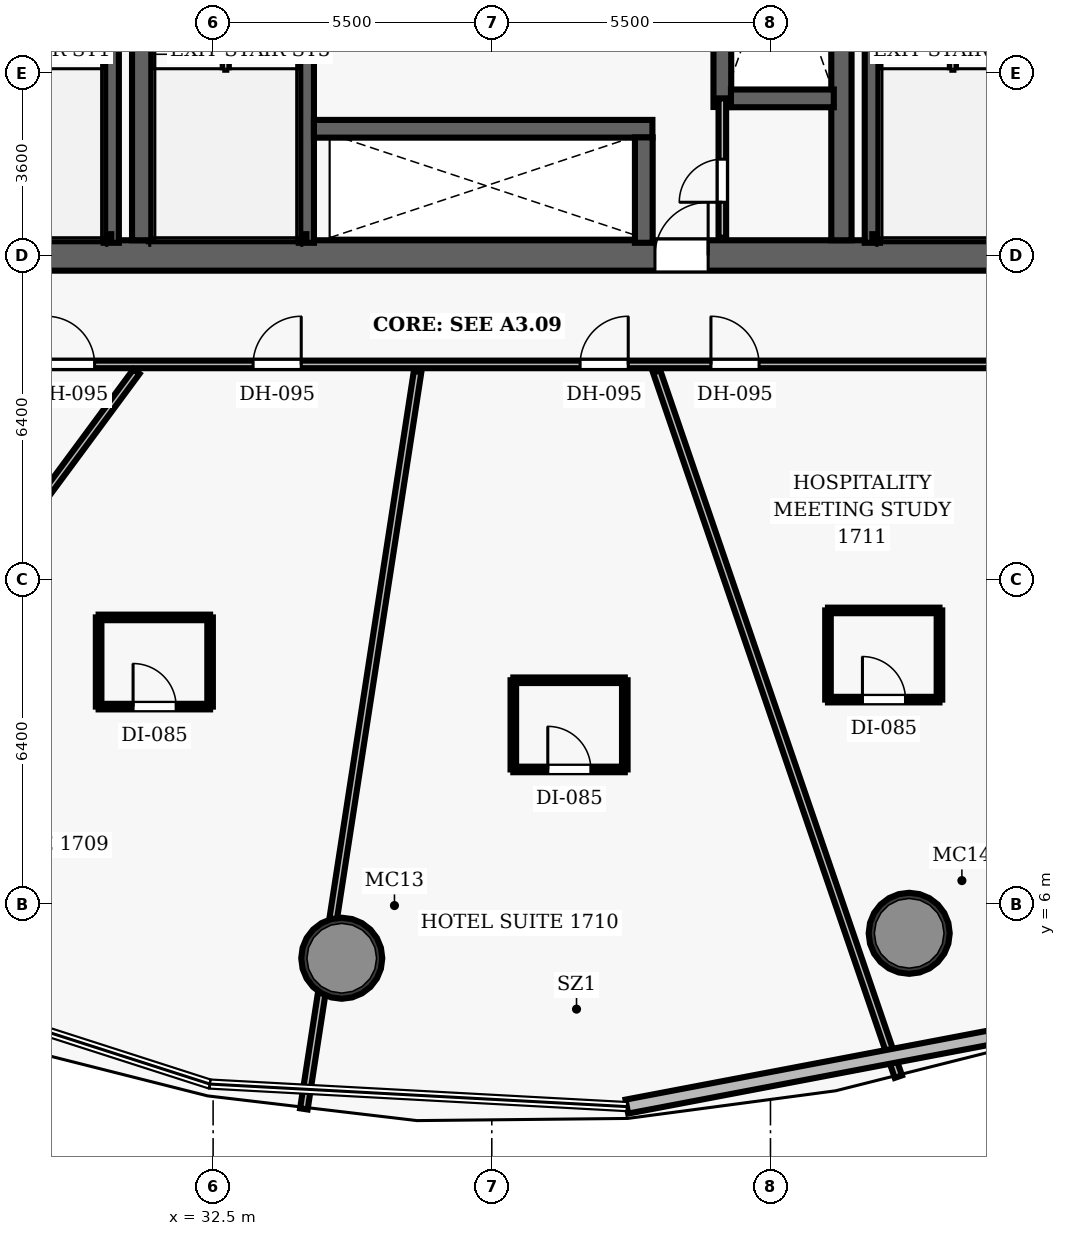
"""IFC4 building model, lengths in metres.
Left out: names, types, materials, properties, quantities, classifications, styles, units other than length and angle.
Written with IfcOpenShell. Run it as: python <this file> out.ifc"""

import sys

from ifc_helpers import new_model, si_unit, direction, frame, frame_2d, origin, origin_2d, place, context, subcontext, project, spatial, rectangle, hollow_circle, extrude, element, fill, save


model = new_model("IFC4")
c1 = context("Model", 3, precision=1e-05, world=origin(), true_north=direction((0.0, 1.0)))
c2 = subcontext(c1, "Body", "Model", "MODEL_VIEW")
j1 = project(units=[si_unit("LENGTHUNIT", "METRE"), si_unit("PLANEANGLEUNIT", "RADIAN")], contexts=[c1])
p1 = place(None, origin())
s1 = spatial("IfcSite", under=j1, at=p1, CompositionType="ELEMENT")
p2 = place(p1, origin())
s2 = spatial("IfcBuilding", under=s1, at=p2, CompositionType="ELEMENT")
p3 = place(p2, frame((0.0, 0.0, 76.4)))
s3 = spatial("IfcBuildingStorey", under=s2, at=p3, CompositionType="ELEMENT", Elevation=76.4)
p4 = place(p3, frame((26.7, 18.8, 0.0), z_axis=(0.0, 0.0, 1.0), x_axis=(1.0, 0.0, 0.0)))
e1 = element("IfcWall", 1, at=p4, inside=s3, PredefinedType="SHEAR", context=c2, shape_type="SweptSolid", body=[
    extrude(rectangle(XDim=22.6, YDim=0.6, at=frame_2d((11.3, 0.0))), origin(), (0.0, 0.0, 1.0), 3.5),
])
p5 = place(p4, frame((14.52, 0.0, 0.0)))
e2 = element("IfcOpeningElement", 2, at=p5, cuts=e1, PredefinedType="OPENING", context=c2, shape_type="SweptSolid", body=[
    extrude(rectangle(XDim=1.05, YDim=2.15, at=frame_2d((0.525, 1.075))), frame((0.0, 0.31, 0.0), z_axis=(0.0, -1.0, 0.0), x_axis=(1.0, 0.0, 0.0)), (0.0, 0.0, 1.0), 0.62),
])
for number, where, z_axis, x_axis in (
    (3, (31.1, 19.1, 0.0), (0.0, 0.0, 1.0), (0.0, 1.0, 0.0)),
    (4, (44.9, 19.1, 0.0), (0.0, 0.0, 1.0), (0.0, 1.0, 0.0)),
):
    element("IfcWall", number, at=place(p3, frame(where, z_axis=z_axis, x_axis=x_axis)), inside=s3, PredefinedType="SHEAR", context=c2, shape_type="SweptSolid", body=[
        extrude(rectangle(XDim=13.8, YDim=0.4, at=frame_2d((6.9, 0.0))), origin(), (0.0, 0.0, 1.0), 3.5),
    ])
for number, where, z_axis, x_axis in (
    (5, (35.039, 4.931, 0.0), (0.0, 0.0, 1.0), (1.0, 0.0, 0.0)),
    (6, (46.238, 5.423, 0.0), (0.0, 0.0, 1.0), (1.0, 0.0, 0.0)),
):
    element("IfcColumn", number, at=place(p3, frame(where, z_axis=z_axis, x_axis=x_axis)), inside=s3, PredefinedType="COLUMN", context=c2, shape_type="SweptSolid", body=[
        extrude(hollow_circle(Radius=0.8, WallThickness=0.06, at=origin_2d()), origin(), (0.0, 0.0, 1.0), 3.5),
    ])
p6 = place(p3, frame((30.49, 19.05, 0.0), z_axis=(0.0, 0.0, 1.0), x_axis=(0.0, 1.0, 0.0)))
e7 = element("IfcWall", 7, at=p6, inside=s3, PredefinedType="SHEAR", context=c2, shape_type="SweptSolid", body=[
    extrude(rectangle(XDim=7.5, YDim=0.3, at=frame_2d((3.75, 0.0))), origin(), (0.0, 0.0, 1.0), 3.5),
])
p7 = place(p3, frame((27.395, 19.16, 0.0), z_axis=(0.0, 0.0, 1.0), x_axis=(1.0, 0.0, 0.0)))
e8 = element("IfcWall", 8, at=p7, inside=s3, PredefinedType="SHEAR", context=c2, shape_type="SweptSolid", body=[
    extrude(rectangle(XDim=3.095, YDim=0.12, at=frame_2d((1.547, 0.0))), origin(), (0.0, 0.0, 1.0), 3.5),
])
p8 = place(p3, frame((45.51, 19.05, 0.0), z_axis=(0.0, 0.0, 1.0), x_axis=(0.0, 1.0, 0.0)))
e9 = element("IfcWall", 9, at=p8, inside=s3, PredefinedType="SHEAR", context=c2, shape_type="SweptSolid", body=[
    extrude(rectangle(XDim=7.5, YDim=0.3, at=frame_2d((3.75, 0.0))), origin(), (0.0, 0.0, 1.0), 3.5),
])
p9 = place(p3, frame((45.51, 19.16, 0.0), z_axis=(0.0, 0.0, 1.0), x_axis=(1.0, 0.0, 0.0)))
e10 = element("IfcWall", 10, at=p9, inside=s3, PredefinedType="SHEAR", context=c2, shape_type="SweptSolid", body=[
    extrude(rectangle(XDim=3.095, YDim=0.12, at=frame_2d((1.547, 0.0))), origin(), (0.0, 0.0, 1.0), 3.5),
])
p10 = place(p3, frame((34.34, 19.05, 0.0), z_axis=(0.0, 0.0, 1.0), x_axis=(0.0, 1.0, 0.0)))
e11 = element("IfcWall", 11, at=p10, inside=s3, PredefinedType="SHEAR", context=c2, shape_type="SweptSolid", body=[
    extrude(rectangle(XDim=7.5, YDim=0.3, at=frame_2d((3.75, 0.0))), origin(), (0.0, 0.0, 1.0), 3.5),
])
p11 = place(p3, frame((31.3, 19.16, 0.0), z_axis=(0.0, 0.0, 1.0), x_axis=(1.0, 0.0, 0.0)))
e12 = element("IfcWall", 12, at=p11, inside=s3, PredefinedType="SHEAR", context=c2, shape_type="SweptSolid", body=[
    extrude(rectangle(XDim=3.04, YDim=0.12, at=frame_2d((1.52, 0.0))), origin(), (0.0, 0.0, 1.0), 3.5),
])
p12 = place(p3, frame((42.55, 21.73, 0.0), z_axis=(0.0, 0.0, 1.0), x_axis=(0.0, 1.0, 0.0)))
e13 = element("IfcWall", 13, at=p12, inside=s3, PredefinedType="SHEAR", context=c2, shape_type="SweptSolid", body=[
    extrude(rectangle(XDim=6.54, YDim=0.35, at=frame_2d((3.27, 0.0))), origin(), (0.0, 0.0, 1.0), 2.6),
])
p13 = place(p3, frame((42.72, 21.9, 0.0), z_axis=(0.0, 0.0, 1.0), x_axis=(1.0, 0.0, 0.0)))
e14 = element("IfcWall", 14, at=p13, inside=s3, PredefinedType="SHEAR", context=c2, shape_type="SweptSolid", body=[
    extrude(rectangle(XDim=2.03, YDim=0.35, at=frame_2d((1.015, 0.0))), origin(), (0.0, 0.0, 1.0), 2.6),
])
p14 = place(p3, frame((34.49, 21.3, 0.0), z_axis=(0.0, 0.0, 1.0), x_axis=(1.0, 0.0, 0.0)))
e15 = element("IfcWall", 15, at=p14, inside=s3, PredefinedType="SHEAR", context=c2, shape_type="SweptSolid", body=[
    extrude(rectangle(XDim=6.68, YDim=0.35, at=frame_2d((3.34, 0.0))), origin(), (0.0, 0.0, 1.0), 2.6),
])
p15 = place(p3, frame((41.0, 19.05, 0.0), z_axis=(0.0, 0.0, 1.0), x_axis=(0.0, 1.0, 0.0)))
e16 = element("IfcWall", 16, at=p15, inside=s3, PredefinedType="SHEAR", context=c2, shape_type="SweptSolid", body=[
    extrude(rectangle(XDim=2.08, YDim=0.35, at=frame_2d((1.04, 0.0))), origin(), (0.0, 0.0, 1.0), 2.6),
])
p16 = place(p3, frame((42.55, 19.15, 0.0), z_axis=(0.0, 0.0, 1.0), x_axis=(0.0, 1.0, 0.0)))
e17 = element("IfcWall", 17, at=p16, inside=s3, PredefinedType="PARTITIONING", context=c2, shape_type="SweptSolid", body=[
    extrude(rectangle(XDim=2.75, YDim=0.15, at=frame_2d((1.375, 0.0))), origin(), (0.0, 0.0, 1.0), 2.6),
])
p17 = place(p16, frame((0.7, 0.0, 0.0)))
e18 = element("IfcOpeningElement", 18, at=p17, cuts=e17, PredefinedType="OPENING", context=c2, shape_type="SweptSolid", body=[
    extrude(rectangle(XDim=0.85, YDim=2.1, at=frame_2d((0.425, 1.05))), frame((0.0, 0.085, 0.0), z_axis=(0.0, -1.0, 0.0), x_axis=(1.0, 0.0, 0.0)), (0.0, 0.0, 1.0), 0.17),
])
p18 = place(p3, frame((24.85, 16.65, 0.0), z_axis=(0.0, 0.0, 1.0), x_axis=(1.0, 0.0, 0.0)))
e19 = element("IfcWall", 19, at=p18, inside=s3, PredefinedType="PARTITIONING", context=c2, shape_type="SweptSolid", body=[
    extrude(rectangle(XDim=23.5, YDim=0.15, at=frame_2d((11.75, 0.0))), origin(), (0.0, 0.0, 1.0), 2.6),
])
p19 = place(p18, frame((4.362, 0.0, 0.0)))
e20 = element("IfcOpeningElement", 20, at=p19, cuts=e19, PredefinedType="OPENING", context=c2, shape_type="SweptSolid", body=[
    extrude(rectangle(XDim=0.95, YDim=2.15, at=frame_2d((0.475, 1.075))), frame((0.0, 0.085, 0.0), z_axis=(0.0, -1.0, 0.0), x_axis=(1.0, 0.0, 0.0)), (0.0, 0.0, 1.0), 0.17),
])
p20 = place(p18, frame((8.439, 0.0, 0.0)))
e21 = element("IfcOpeningElement", 21, at=p20, cuts=e19, PredefinedType="OPENING", context=c2, shape_type="SweptSolid", body=[
    extrude(rectangle(XDim=0.95, YDim=2.15, at=frame_2d((0.475, 1.075))), frame((0.0, 0.085, 0.0), z_axis=(0.0, -1.0, 0.0), x_axis=(1.0, 0.0, 0.0)), (0.0, 0.0, 1.0), 0.17),
])
p21 = place(p18, frame((14.893, 0.0, 0.0)))
e22 = element("IfcOpeningElement", 22, at=p21, cuts=e19, PredefinedType="OPENING", context=c2, shape_type="SweptSolid", body=[
    extrude(rectangle(XDim=0.95, YDim=2.15, at=frame_2d((0.475, 1.075))), frame((0.0, 0.085, 0.0), z_axis=(0.0, -1.0, 0.0), x_axis=(1.0, 0.0, 0.0)), (0.0, 0.0, 1.0), 0.17),
])
p22 = place(p18, frame((17.475, 0.0, 0.0)))
e23 = element("IfcOpeningElement", 23, at=p22, cuts=e19, PredefinedType="OPENING", context=c2, shape_type="SweptSolid", body=[
    extrude(rectangle(XDim=0.95, YDim=2.15, at=frame_2d((0.475, 1.075))), frame((0.0, 0.085, 0.0), z_axis=(0.0, -1.0, 0.0), x_axis=(1.0, 0.0, 0.0)), (0.0, 0.0, 1.0), 0.17),
])
p23 = place(p3, frame((30.988, 16.51, 0.0), z_axis=(0.0, 0.0, 1.0), x_axis=(-0.594280459422, -0.804257878761, 0.0)))
e24 = element("IfcWall", 24, at=p23, inside=s3, PredefinedType="PARTITIONING", context=c2, shape_type="SweptSolid", body=[
    extrude(rectangle(XDim=13.593, YDim=0.15, at=frame_2d((6.796, 0.0))), origin(), (0.0, 0.0, 1.0), 2.6),
])
p24 = place(p3, frame((36.536, 16.51, 0.0), z_axis=(0.0, 0.0, 1.0), x_axis=(-0.152462111612, -0.988309316218, 0.0)))
e25 = element("IfcWall", 25, at=p24, inside=s3, PredefinedType="PARTITIONING", context=c2, shape_type="SweptSolid", body=[
    extrude(rectangle(XDim=14.724, YDim=0.15, at=frame_2d((7.362, 0.0))), origin(), (0.0, 0.0, 1.0), 2.6),
])
p25 = place(p3, frame((41.253, 16.51, 0.0), z_axis=(0.0, 0.0, 1.0), x_axis=(0.324297168355, -0.945955256128, 0.0)))
e26 = element("IfcWall", 26, at=p25, inside=s3, PredefinedType="PARTITIONING", context=c2, shape_type="SweptSolid", body=[
    extrude(rectangle(XDim=14.71, YDim=0.15, at=frame_2d((7.355, 0.0))), origin(), (0.0, 0.0, 1.0), 2.6),
])
p26 = place(p3, frame((30.24, 9.897, 0.0), z_axis=(0.0, 0.0, 1.0), x_axis=(1.0, 0.0, 0.0)))
e27 = element("IfcWall", 27, at=p26, inside=s3, PredefinedType="PARTITIONING", context=c2, shape_type="SweptSolid", body=[
    extrude(rectangle(XDim=2.2, YDim=0.11, at=frame_2d((1.1, 0.0))), origin(), (0.0, 0.0, 1.0), 2.6),
])
p27 = place(p26, frame((0.68, 0.0, 0.0)))
e28 = element("IfcOpeningElement", 28, at=p27, cuts=e27, PredefinedType="OPENING", context=c2, shape_type="SweptSolid", body=[
    extrude(rectangle(XDim=0.85, YDim=2.1, at=frame_2d((0.425, 1.05))), frame((0.0, 0.065, 0.0), z_axis=(0.0, -1.0, 0.0), x_axis=(1.0, 0.0, 0.0)), (0.0, 0.0, 1.0), 0.13),
])
p28 = place(p3, frame((30.24, 11.657, 0.0), z_axis=(0.0, 0.0, 1.0), x_axis=(1.0, 0.0, 0.0)))
e29 = element("IfcWall", 29, at=p28, inside=s3, PredefinedType="PARTITIONING", context=c2, shape_type="SweptSolid", body=[
    extrude(rectangle(XDim=2.2, YDim=0.11, at=frame_2d((1.1, 0.0))), origin(), (0.0, 0.0, 1.0), 2.6),
])
for number, where, z_axis, x_axis in (
    (30, (30.24, 9.897, 0.0), (0.0, 0.0, 1.0), (0.0, 1.0, 0.0)),
    (31, (32.441, 9.897, 0.0), (0.0, 0.0, 1.0), (0.0, 1.0, 0.0)),
):
    element("IfcWall", number, at=place(p3, frame(where, z_axis=z_axis, x_axis=x_axis)), inside=s3, PredefinedType="PARTITIONING", context=c2, shape_type="SweptSolid", body=[
        extrude(rectangle(XDim=1.76, YDim=0.11, at=frame_2d((0.88, 0.0))), origin(), (0.0, 0.0, 1.0), 2.6),
    ])
p29 = place(p3, frame((38.425, 8.657, 0.0), z_axis=(0.0, 0.0, 1.0), x_axis=(1.0, 0.0, 0.0)))
e32 = element("IfcWall", 32, at=p29, inside=s3, PredefinedType="PARTITIONING", context=c2, shape_type="SweptSolid", body=[
    extrude(rectangle(XDim=2.2, YDim=0.11, at=frame_2d((1.1, 0.0))), origin(), (0.0, 0.0, 1.0), 2.6),
])
p30 = place(p29, frame((0.68, 0.0, 0.0)))
e33 = element("IfcOpeningElement", 33, at=p30, cuts=e32, PredefinedType="OPENING", context=c2, shape_type="SweptSolid", body=[
    extrude(rectangle(XDim=0.85, YDim=2.1, at=frame_2d((0.425, 1.05))), frame((0.0, 0.065, 0.0), z_axis=(0.0, -1.0, 0.0), x_axis=(1.0, 0.0, 0.0)), (0.0, 0.0, 1.0), 0.13),
])
p31 = place(p3, frame((38.425, 10.417, 0.0), z_axis=(0.0, 0.0, 1.0), x_axis=(1.0, 0.0, 0.0)))
e34 = element("IfcWall", 34, at=p31, inside=s3, PredefinedType="PARTITIONING", context=c2, shape_type="SweptSolid", body=[
    extrude(rectangle(XDim=2.2, YDim=0.11, at=frame_2d((1.1, 0.0))), origin(), (0.0, 0.0, 1.0), 2.6),
])
for number, where, z_axis, x_axis in (
    (35, (38.425, 8.657, 0.0), (0.0, 0.0, 1.0), (0.0, 1.0, 0.0)),
    (36, (40.625, 8.657, 0.0), (0.0, 0.0, 1.0), (0.0, 1.0, 0.0)),
):
    element("IfcWall", number, at=place(p3, frame(where, z_axis=z_axis, x_axis=x_axis)), inside=s3, PredefinedType="PARTITIONING", context=c2, shape_type="SweptSolid", body=[
        extrude(rectangle(XDim=1.76, YDim=0.11, at=frame_2d((0.88, 0.0))), origin(), (0.0, 0.0, 1.0), 2.6),
    ])
p32 = place(p3, frame((44.635, 10.035, 0.0), z_axis=(0.0, 0.0, 1.0), x_axis=(1.0, 0.0, 0.0)))
e37 = element("IfcWall", 37, at=p32, inside=s3, PredefinedType="PARTITIONING", context=c2, shape_type="SweptSolid", body=[
    extrude(rectangle(XDim=2.2, YDim=0.11, at=frame_2d((1.1, 0.0))), origin(), (0.0, 0.0, 1.0), 2.6),
])
p33 = place(p32, frame((0.68, 0.0, 0.0)))
e38 = element("IfcOpeningElement", 38, at=p33, cuts=e37, PredefinedType="OPENING", context=c2, shape_type="SweptSolid", body=[
    extrude(rectangle(XDim=0.85, YDim=2.1, at=frame_2d((0.425, 1.05))), frame((0.0, 0.065, 0.0), z_axis=(0.0, -1.0, 0.0), x_axis=(1.0, 0.0, 0.0)), (0.0, 0.0, 1.0), 0.13),
])
p34 = place(p3, frame((44.635, 11.795, 0.0), z_axis=(0.0, 0.0, 1.0), x_axis=(1.0, 0.0, 0.0)))
e39 = element("IfcWall", 39, at=p34, inside=s3, PredefinedType="PARTITIONING", context=c2, shape_type="SweptSolid", body=[
    extrude(rectangle(XDim=2.2, YDim=0.11, at=frame_2d((1.1, 0.0))), origin(), (0.0, 0.0, 1.0), 2.6),
])
for number, where, z_axis, x_axis in (
    (40, (44.635, 10.035, 0.0), (0.0, 0.0, 1.0), (0.0, 1.0, 0.0)),
    (41, (46.835, 10.035, 0.0), (0.0, 0.0, 1.0), (0.0, 1.0, 0.0)),
):
    element("IfcWall", number, at=place(p3, frame(where, z_axis=z_axis, x_axis=x_axis)), inside=s3, PredefinedType="PARTITIONING", context=c2, shape_type="SweptSolid", body=[
        extrude(rectangle(XDim=1.76, YDim=0.11, at=frame_2d((0.88, 0.0))), origin(), (0.0, 0.0, 1.0), 2.6),
    ])
p35 = place(p3, frame((48.692, 3.531, 0.0), z_axis=(0.0, 0.0, 1.0), x_axis=(-0.982367584705, -0.186959697585, 0.0)))
e42 = element("IfcWall", 42, at=p35, inside=s3, PredefinedType="SOLIDWALL", context=c2, shape_type="SweptSolid", body=[
    extrude(rectangle(XDim=8.171, YDim=0.28, at=frame_2d((4.085, 0.0))), origin(), (0.0, 0.0, 1.0), 3.25),
])
p36 = place(p5, origin())
e43 = element("IfcDoor", 43, at=p36, inside=s3, OperationType="SINGLE_SWING_RIGHT", PredefinedType="DOOR", context=c2, shape_type="SweptSolid", body=[
    extrude(rectangle(XDim=1.05, YDim=2.15, at=frame_2d((0.525, 1.075))), frame((0.0, 0.025, 0.0), z_axis=(0.0, -1.0, 0.0), x_axis=(1.0, 0.0, 0.0)), (0.0, 0.0, 1.0), 0.05),
])
fill(e2, e43)
p37 = place(p17, origin())
e44 = element("IfcDoor", 44, at=p37, inside=s3, OperationType="SINGLE_SWING_LEFT", PredefinedType="DOOR", context=c2, shape_type="SweptSolid", body=[
    extrude(rectangle(XDim=0.85, YDim=2.1, at=frame_2d((0.425, 1.05))), frame((0.0, 0.025, 0.0), z_axis=(0.0, -1.0, 0.0), x_axis=(1.0, 0.0, 0.0)), (0.0, 0.0, 1.0), 0.05),
])
fill(e18, e44)
p38 = place(p19, origin())
e45 = element("IfcDoor", 45, at=p38, inside=s3, OperationType="SINGLE_SWING_LEFT", PredefinedType="DOOR", context=c2, shape_type="SweptSolid", body=[
    extrude(rectangle(XDim=0.95, YDim=2.15, at=frame_2d((0.475, 1.075))), frame((0.0, 0.025, 0.0), z_axis=(0.0, -1.0, 0.0), x_axis=(1.0, 0.0, 0.0)), (0.0, 0.0, 1.0), 0.05),
])
fill(e20, e45)
p39 = place(p20, origin())
e46 = element("IfcDoor", 46, at=p39, inside=s3, OperationType="SINGLE_SWING_RIGHT", PredefinedType="DOOR", context=c2, shape_type="SweptSolid", body=[
    extrude(rectangle(XDim=0.95, YDim=2.15, at=frame_2d((0.475, 1.075))), frame((0.0, 0.025, 0.0), z_axis=(0.0, -1.0, 0.0), x_axis=(1.0, 0.0, 0.0)), (0.0, 0.0, 1.0), 0.05),
])
fill(e21, e46)
p40 = place(p27, origin())
e47 = element("IfcDoor", 47, at=p40, inside=s3, OperationType="SINGLE_SWING_LEFT", PredefinedType="DOOR", context=c2, shape_type="SweptSolid", body=[
    extrude(rectangle(XDim=0.85, YDim=2.1, at=frame_2d((0.425, 1.05))), frame((0.0, 0.025, 0.0), z_axis=(0.0, -1.0, 0.0), x_axis=(1.0, 0.0, 0.0)), (0.0, 0.0, 1.0), 0.05),
])
fill(e28, e47)
p41 = place(p21, origin())
e48 = element("IfcDoor", 48, at=p41, inside=s3, OperationType="SINGLE_SWING_RIGHT", PredefinedType="DOOR", context=c2, shape_type="SweptSolid", body=[
    extrude(rectangle(XDim=0.95, YDim=2.15, at=frame_2d((0.475, 1.075))), frame((0.0, 0.025, 0.0), z_axis=(0.0, -1.0, 0.0), x_axis=(1.0, 0.0, 0.0)), (0.0, 0.0, 1.0), 0.05),
])
fill(e22, e48)
p42 = place(p30, origin())
e49 = element("IfcDoor", 49, at=p42, inside=s3, OperationType="SINGLE_SWING_LEFT", PredefinedType="DOOR", context=c2, shape_type="SweptSolid", body=[
    extrude(rectangle(XDim=0.85, YDim=2.1, at=frame_2d((0.425, 1.05))), frame((0.0, 0.025, 0.0), z_axis=(0.0, -1.0, 0.0), x_axis=(1.0, 0.0, 0.0)), (0.0, 0.0, 1.0), 0.05),
])
fill(e33, e49)
p43 = place(p22, origin())
e50 = element("IfcDoor", 50, at=p43, inside=s3, OperationType="SINGLE_SWING_LEFT", PredefinedType="DOOR", context=c2, shape_type="SweptSolid", body=[
    extrude(rectangle(XDim=0.95, YDim=2.15, at=frame_2d((0.475, 1.075))), frame((0.0, 0.025, 0.0), z_axis=(0.0, -1.0, 0.0), x_axis=(1.0, 0.0, 0.0)), (0.0, 0.0, 1.0), 0.05),
])
fill(e23, e50)
p44 = place(p33, origin())
e51 = element("IfcDoor", 51, at=p44, inside=s3, OperationType="SINGLE_SWING_LEFT", PredefinedType="DOOR", context=c2, shape_type="SweptSolid", body=[
    extrude(rectangle(XDim=0.85, YDim=2.1, at=frame_2d((0.425, 1.05))), frame((0.0, 0.025, 0.0), z_axis=(0.0, -1.0, 0.0), x_axis=(1.0, 0.0, 0.0)), (0.0, 0.0, 1.0), 0.05),
])
fill(e38, e51)
save(model, sys.argv[1])
